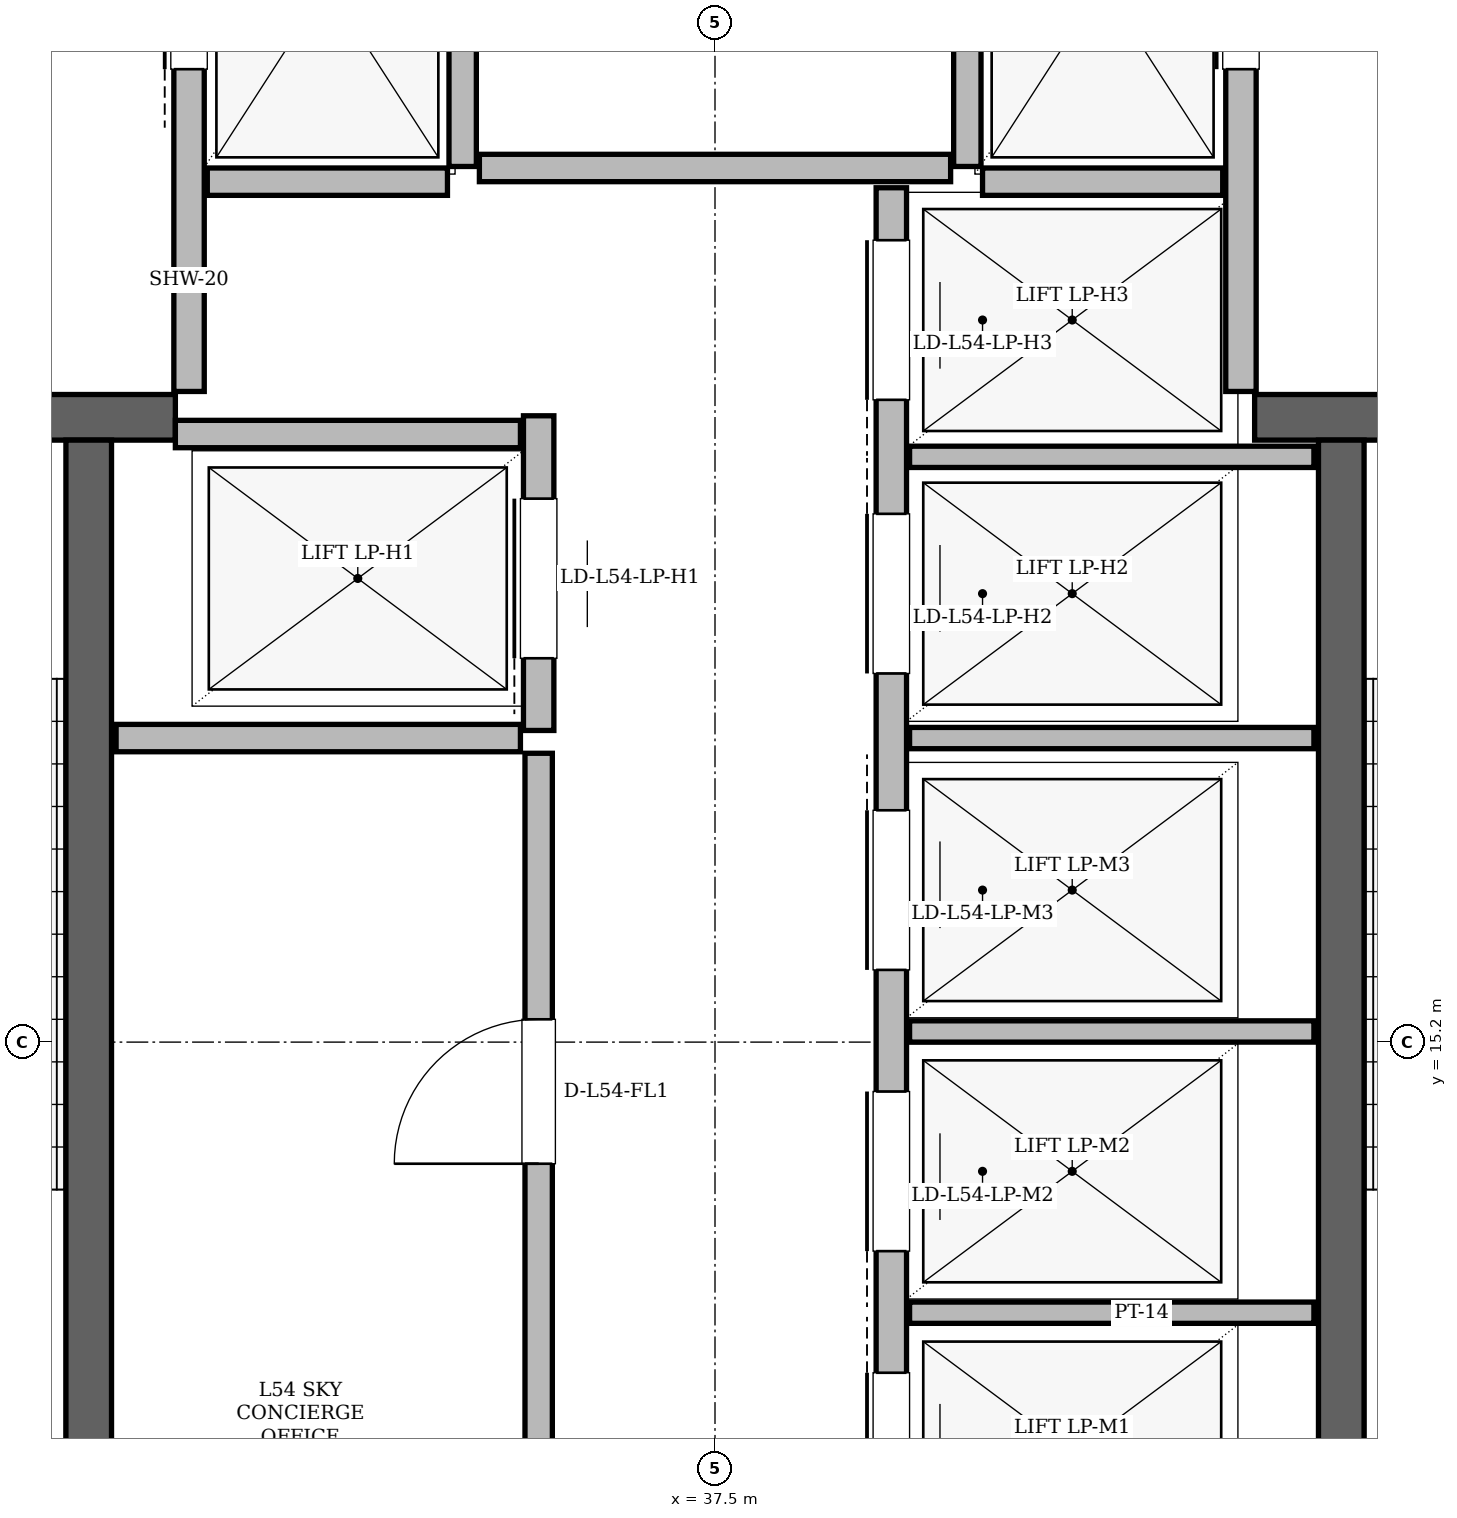
"""IFC4 building model, lengths in metres.
Left out: names, types, materials, properties, quantities, classifications, styles, units other than length and angle.
Written with IfcOpenShell. Run it as: python <this file> out.ifc"""

import sys

from ifc_helpers import new_model, si_unit, direction, frame, frame_2d, origin, place, context, subcontext, project, spatial, rectangle, extrude, element, fill, save


model = new_model("IFC4")
c1 = context("Model", 3, precision=1e-05, world=origin(), true_north=direction((0.0, 1.0)))
c2 = subcontext(c1, "Body", "Model", "MODEL_VIEW")
j1 = project(units=[si_unit("LENGTHUNIT", "METRE"), si_unit("PLANEANGLEUNIT", "RADIAN")], contexts=[c1])
p1 = place(None, origin())
s1 = spatial("IfcSite", under=j1, at=p1, CompositionType="ELEMENT")
p2 = place(p1, origin())
s2 = spatial("IfcBuilding", under=s1, at=p2, CompositionType="ELEMENT")
p3 = place(p2, frame((0.0, 0.0, 204.6)))
s3 = spatial("IfcBuildingStorey", under=s2, at=p3, CompositionType="ELEMENT", Elevation=204.6)
p4 = place(p3, frame((29.94, 19.31, 0.0), z_axis=(0.0, 0.0, 1.0), x_axis=(1.0, 0.0, 0.0)))
e1 = element("IfcWall", 1, at=p4, inside=s3, PredefinedType="SHEAR", context=c2, shape_type="SweptSolid", body=[
    extrude(rectangle(XDim=4.01, YDim=0.3, at=frame_2d((2.005, 0.0))), origin(), (0.0, 0.0, 1.0), 4.28),
])
p5 = place(p4, frame((1.01, 0.0, 0.0)))
e2 = element("IfcOpeningElement", 2, at=p5, cuts=e1, PredefinedType="OPENING", context=c2, shape_type="SweptSolid", body=[
    extrude(rectangle(XDim=1.4, YDim=2.2, at=frame_2d((0.7, 1.1))), frame((0.0, 0.15, 0.0), z_axis=(0.0, -1.0, 0.0), x_axis=(1.0, 0.0, 0.0)), (0.0, 0.0, 1.0), 0.3),
])
p6 = place(p3, frame((41.05, 19.31, 0.0), z_axis=(0.0, 0.0, 1.0), x_axis=(1.0, 0.0, 0.0)))
e3 = element("IfcWall", 3, at=p6, inside=s3, PredefinedType="SHEAR", context=c2, shape_type="SweptSolid", body=[
    extrude(rectangle(XDim=4.01, YDim=0.3, at=frame_2d((2.005, 0.0))), origin(), (0.0, 0.0, 1.0), 4.28),
])
p7 = place(p6, frame((1.6, 0.0, 0.0)))
e4 = element("IfcOpeningElement", 4, at=p7, cuts=e3, PredefinedType="OPENING", context=c2, shape_type="SweptSolid", body=[
    extrude(rectangle(XDim=1.4, YDim=2.2, at=frame_2d((0.7, 1.1))), frame((0.0, 0.15, 0.0), z_axis=(0.0, -1.0, 0.0), x_axis=(1.0, 0.0, 0.0)), (0.0, 0.0, 1.0), 0.3),
])
for number, where, z_axis, x_axis in (
    (5, (33.38, 11.54, 0.0), (0.0, 0.0, 1.0), (0.0, 1.0, 0.0)),
    (6, (41.62, 11.54, 0.0), (0.0, 0.0, 1.0), (0.0, 1.0, 0.0)),
):
    element("IfcWall", number, at=place(p3, frame(where, z_axis=z_axis, x_axis=x_axis)), inside=s3, PredefinedType="SHEAR", context=c2, shape_type="SweptSolid", body=[
        extrude(rectangle(XDim=7.62, YDim=0.3, at=frame_2d((3.81, 0.0))), origin(), (0.0, 0.0, 1.0), 4.28),
    ])
p8 = place(p3, frame((34.04, 19.48, 0.0), z_axis=(0.0, 0.0, 1.0), x_axis=(0.0, 1.0, 0.0)))
e7 = element("IfcWall", 7, at=p8, inside=s3, PredefinedType="PARTITIONING", context=c2, shape_type="SweptSolid", body=[
    extrude(rectangle(XDim=4.5, YDim=0.2, at=frame_2d((2.25, 0.0))), origin(), (0.0, 0.0, 1.0), 4.28),
])
p9 = place(p8, frame((2.12, 0.0, 0.0)))
e8 = element("IfcOpeningElement", 8, at=p9, cuts=e7, PredefinedType="OPENING", context=c2, shape_type="SweptSolid", body=[
    extrude(rectangle(XDim=1.1, YDim=2.2, at=frame_2d((0.55, 1.1))), frame((0.0, 0.1, 0.0), z_axis=(0.0, -1.0, 0.0), x_axis=(1.0, 0.0, 0.0)), (0.0, 0.0, 1.0), 0.2),
])
p10 = place(p3, frame((35.84, 20.96, 0.0), z_axis=(0.0, 0.0, 1.0), x_axis=(0.0, 1.0, 0.0)))
e9 = element("IfcWall", 9, at=p10, inside=s3, PredefinedType="PARTITIONING", context=c2, shape_type="SweptSolid", body=[
    extrude(rectangle(XDim=3.02, YDim=0.18, at=frame_2d((1.51, 0.0))), origin(), (0.0, 0.0, 1.0), 4.28),
])
p11 = place(p3, frame((34.16, 20.86, 0.0), z_axis=(0.0, 0.0, 1.0), x_axis=(1.0, 0.0, 0.0)))
e10 = element("IfcWall", 10, at=p11, inside=s3, PredefinedType="PARTITIONING", context=c2, shape_type="SweptSolid", body=[
    extrude(rectangle(XDim=1.58, YDim=0.18, at=frame_2d((0.79, 0.0))), origin(), (0.0, 0.0, 1.0), 4.28),
])
p12 = place(p3, frame((40.96, 19.48, 0.0), z_axis=(0.0, 0.0, 1.0), x_axis=(0.0, 1.0, 0.0)))
e11 = element("IfcWall", 11, at=p12, inside=s3, PredefinedType="PARTITIONING", context=c2, shape_type="SweptSolid", body=[
    extrude(rectangle(XDim=4.5, YDim=0.2, at=frame_2d((2.25, 0.0))), origin(), (0.0, 0.0, 1.0), 4.28),
])
p13 = place(p12, frame((2.12, 0.0, 0.0)))
e12 = element("IfcOpeningElement", 12, at=p13, cuts=e11, PredefinedType="OPENING", context=c2, shape_type="SweptSolid", body=[
    extrude(rectangle(XDim=1.1, YDim=2.2, at=frame_2d((0.55, 1.1))), frame((0.0, 0.1, 0.0), z_axis=(0.0, -1.0, 0.0), x_axis=(1.0, 0.0, 0.0)), (0.0, 0.0, 1.0), 0.2),
])
p14 = place(p3, frame((39.16, 20.96, 0.0), z_axis=(0.0, 0.0, 1.0), x_axis=(0.0, 1.0, 0.0)))
e13 = element("IfcWall", 13, at=p14, inside=s3, PredefinedType="PARTITIONING", context=c2, shape_type="SweptSolid", body=[
    extrude(rectangle(XDim=3.02, YDim=0.18, at=frame_2d((1.51, 0.0))), origin(), (0.0, 0.0, 1.0), 4.28),
])
p15 = place(p3, frame((39.26, 20.86, 0.0), z_axis=(0.0, 0.0, 1.0), x_axis=(1.0, 0.0, 0.0)))
e14 = element("IfcWall", 14, at=p15, inside=s3, PredefinedType="PARTITIONING", context=c2, shape_type="SweptSolid", body=[
    extrude(rectangle(XDim=1.58, YDim=0.18, at=frame_2d((0.79, 0.0))), origin(), (0.0, 0.0, 1.0), 4.28),
])
p16 = place(p3, frame((36.34, 17.25, 0.0), z_axis=(0.0, 0.0, 1.0), x_axis=(0.0, 1.0, 0.0)))
e15 = element("IfcWall", 15, at=p16, inside=s3, PredefinedType="PARTITIONING", context=c2, shape_type="SweptSolid", body=[
    extrude(rectangle(XDim=2.07, YDim=0.2, at=frame_2d((1.035, 0.0))), origin(), (0.0, 0.0, 1.0), 4.28),
])
p17 = place(p16, frame((0.475, 0.0, 0.0)))
e16 = element("IfcOpeningElement", 16, at=p17, cuts=e15, PredefinedType="OPENING", context=c2, shape_type="SweptSolid", body=[
    extrude(rectangle(XDim=1.05, YDim=2.15, at=frame_2d((0.525, 1.075))), frame((0.0, 0.1, 0.0), z_axis=(0.0, -1.0, 0.0), x_axis=(1.0, 0.0, 0.0)), (0.0, 0.0, 1.0), 0.2),
])
p18 = place(p3, frame((33.95, 19.2, 0.0), z_axis=(0.0, 0.0, 1.0), x_axis=(1.0, 0.0, 0.0)))
e17 = element("IfcWall", 17, at=p18, inside=s3, PredefinedType="PARTITIONING", context=c2, shape_type="SweptSolid", body=[
    extrude(rectangle(XDim=2.27, YDim=0.18, at=frame_2d((1.135, 0.0))), origin(), (0.0, 0.0, 1.0), 4.28),
])
p19 = place(p3, frame((33.56, 17.2, 0.0), z_axis=(0.0, 0.0, 1.0), x_axis=(1.0, 0.0, 0.0)))
e18 = element("IfcWall", 18, at=p19, inside=s3, PredefinedType="PARTITIONING", context=c2, shape_type="SweptSolid", body=[
    extrude(rectangle(XDim=2.66, YDim=0.18, at=frame_2d((1.33, 0.0))), origin(), (0.0, 0.0, 1.0), 4.28),
])
p20 = place(p3, frame((36.34, 11.55, 0.0), z_axis=(0.0, 0.0, 1.0), x_axis=(0.0, 1.0, 0.0)))
e19 = element("IfcWall", 19, at=p20, inside=s3, PredefinedType="PARTITIONING", context=c2, shape_type="SweptSolid", body=[
    extrude(rectangle(XDim=5.55, YDim=0.18, at=frame_2d((2.775, 0.0))), origin(), (0.0, 0.0, 1.0), 4.28),
])
p21 = place(p20, frame((2.85, 0.0, 0.0)))
e20 = element("IfcOpeningElement", 20, at=p21, cuts=e19, PredefinedType="OPENING", context=c2, shape_type="SweptSolid", body=[
    extrude(rectangle(XDim=0.95, YDim=2.1, at=frame_2d((0.475, 1.05))), frame((0.0, 0.09, 0.0), z_axis=(0.0, -1.0, 0.0), x_axis=(1.0, 0.0, 0.0)), (0.0, 0.0, 1.0), 0.18),
])
p22 = place(p3, frame((38.66, 11.72, 0.0), z_axis=(0.0, 0.0, 1.0), x_axis=(0.0, 1.0, 0.0)))
e21 = element("IfcWall", 21, at=p22, inside=s3, PredefinedType="PARTITIONING", context=c2, shape_type="SweptSolid", body=[
    extrude(rectangle(XDim=9.1, YDim=0.2, at=frame_2d((4.55, 0.0))), origin(), (0.0, 0.0, 1.0), 4.28),
])
p23 = place(p22, frame((0.255, 0.0, 0.0)))
e22 = element("IfcOpeningElement", 22, at=p23, cuts=e21, PredefinedType="OPENING", context=c2, shape_type="SweptSolid", body=[
    extrude(rectangle(XDim=1.05, YDim=2.15, at=frame_2d((0.525, 1.075))), frame((0.0, 0.1, 0.0), z_axis=(0.0, -1.0, 0.0), x_axis=(1.0, 0.0, 0.0)), (0.0, 0.0, 1.0), 0.2),
])
p24 = place(p22, frame((2.105, 0.0, 0.0)))
e23 = element("IfcOpeningElement", 23, at=p24, cuts=e21, PredefinedType="OPENING", context=c2, shape_type="SweptSolid", body=[
    extrude(rectangle(XDim=1.05, YDim=2.15, at=frame_2d((0.525, 1.075))), frame((0.0, 0.1, 0.0), z_axis=(0.0, -1.0, 0.0), x_axis=(1.0, 0.0, 0.0)), (0.0, 0.0, 1.0), 0.2),
])
p25 = place(p22, frame((3.955, 0.0, 0.0)))
e24 = element("IfcOpeningElement", 24, at=p25, cuts=e21, PredefinedType="OPENING", context=c2, shape_type="SweptSolid", body=[
    extrude(rectangle(XDim=1.05, YDim=2.15, at=frame_2d((0.525, 1.075))), frame((0.0, 0.1, 0.0), z_axis=(0.0, -1.0, 0.0), x_axis=(1.0, 0.0, 0.0)), (0.0, 0.0, 1.0), 0.2),
])
p26 = place(p22, frame((5.905, 0.0, 0.0)))
e25 = element("IfcOpeningElement", 25, at=p26, cuts=e21, PredefinedType="OPENING", context=c2, shape_type="SweptSolid", body=[
    extrude(rectangle(XDim=1.05, YDim=2.15, at=frame_2d((0.525, 1.075))), frame((0.0, 0.1, 0.0), z_axis=(0.0, -1.0, 0.0), x_axis=(1.0, 0.0, 0.0)), (0.0, 0.0, 1.0), 0.2),
])
p27 = place(p22, frame((7.705, 0.0, 0.0)))
e26 = element("IfcOpeningElement", 26, at=p27, cuts=e21, PredefinedType="OPENING", context=c2, shape_type="SweptSolid", body=[
    extrude(rectangle(XDim=1.05, YDim=2.15, at=frame_2d((0.525, 1.075))), frame((0.0, 0.1, 0.0), z_axis=(0.0, -1.0, 0.0), x_axis=(1.0, 0.0, 0.0)), (0.0, 0.0, 1.0), 0.2),
])
for number, where, z_axis, x_axis in (
    (27, (38.78, 13.42, 0.0), (0.0, 0.0, 1.0), (1.0, 0.0, 0.0)),
    (28, (38.78, 15.27, 0.0), (0.0, 0.0, 1.0), (1.0, 0.0, 0.0)),
    (29, (38.78, 17.2, 0.0), (0.0, 0.0, 1.0), (1.0, 0.0, 0.0)),
    (30, (38.78, 19.05, 0.0), (0.0, 0.0, 1.0), (1.0, 0.0, 0.0)),
):
    element("IfcWall", number, at=place(p3, frame(where, z_axis=z_axis, x_axis=x_axis)), inside=s3, PredefinedType="PARTITIONING", context=c2, shape_type="SweptSolid", body=[
        extrude(rectangle(XDim=2.66, YDim=0.14, at=frame_2d((1.33, 0.0))), origin(), (0.0, 0.0, 1.0), 4.28),
    ])
p28 = place(p3, frame((35.95, 20.95, 0.0), z_axis=(0.0, 0.0, 1.0), x_axis=(1.0, 0.0, 0.0)))
e31 = element("IfcWall", 31, at=p28, inside=s3, PredefinedType="PARTITIONING", context=c2, shape_type="SweptSolid", body=[
    extrude(rectangle(XDim=3.1, YDim=0.18, at=frame_2d((1.55, 0.0))), origin(), (0.0, 0.0, 1.0), 4.28),
])
p29 = place(p21, origin())
e32 = element("IfcDoor", 32, at=p29, inside=s3, OperationType="SINGLE_SWING_LEFT", PredefinedType="DOOR", context=c2, shape_type="SweptSolid", body=[
    extrude(rectangle(XDim=0.95, YDim=2.1, at=frame_2d((0.475, 1.05))), frame((0.0, 0.025, 0.0), z_axis=(0.0, -1.0, 0.0), x_axis=(1.0, 0.0, 0.0)), (0.0, 0.0, 1.0), 0.05),
])
fill(e20, e32)
p30 = place(p9, origin())
e33 = element("IfcDoor", 33, at=p30, inside=s3, OperationType="SLIDING_TO_LEFT", PredefinedType="DOOR", context=c2, shape_type="SweptSolid", body=[
    extrude(rectangle(XDim=1.1, YDim=2.2, at=frame_2d((0.55, 1.1))), frame((0.0, 0.025, 0.0), z_axis=(0.0, -1.0, 0.0), x_axis=(1.0, 0.0, 0.0)), (0.0, 0.0, 1.0), 0.05),
])
fill(e8, e33)
p31 = place(p13, origin())
e34 = element("IfcDoor", 34, at=p31, inside=s3, OperationType="SLIDING_TO_RIGHT", PredefinedType="DOOR", context=c2, shape_type="SweptSolid", body=[
    extrude(rectangle(XDim=1.1, YDim=2.2, at=frame_2d((0.55, 1.1))), frame((0.0, 0.025, 0.0), z_axis=(0.0, -1.0, 0.0), x_axis=(1.0, 0.0, 0.0)), (0.0, 0.0, 1.0), 0.05),
])
fill(e12, e34)
p32 = place(p23, origin())
e35 = element("IfcDoor", 35, at=p32, inside=s3, OperationType="SLIDING_TO_RIGHT", PredefinedType="DOOR", context=c2, shape_type="SweptSolid", body=[
    extrude(rectangle(XDim=1.05, YDim=2.15, at=frame_2d((0.525, 1.075))), frame((0.0, 0.025, 0.0), z_axis=(0.0, -1.0, 0.0), x_axis=(1.0, 0.0, 0.0)), (0.0, 0.0, 1.0), 0.05),
])
fill(e22, e35)
p33 = place(p24, origin())
e36 = element("IfcDoor", 36, at=p33, inside=s3, OperationType="SLIDING_TO_LEFT", PredefinedType="DOOR", context=c2, shape_type="SweptSolid", body=[
    extrude(rectangle(XDim=1.05, YDim=2.15, at=frame_2d((0.525, 1.075))), frame((0.0, 0.025, 0.0), z_axis=(0.0, -1.0, 0.0), x_axis=(1.0, 0.0, 0.0)), (0.0, 0.0, 1.0), 0.05),
])
fill(e23, e36)
p34 = place(p25, origin())
e37 = element("IfcDoor", 37, at=p34, inside=s3, OperationType="SLIDING_TO_RIGHT", PredefinedType="DOOR", context=c2, shape_type="SweptSolid", body=[
    extrude(rectangle(XDim=1.05, YDim=2.15, at=frame_2d((0.525, 1.075))), frame((0.0, 0.025, 0.0), z_axis=(0.0, -1.0, 0.0), x_axis=(1.0, 0.0, 0.0)), (0.0, 0.0, 1.0), 0.05),
])
fill(e24, e37)
p35 = place(p17, origin())
e38 = element("IfcDoor", 38, at=p35, inside=s3, OperationType="SLIDING_TO_LEFT", PredefinedType="DOOR", context=c2, shape_type="SweptSolid", body=[
    extrude(rectangle(XDim=1.05, YDim=2.15, at=frame_2d((0.525, 1.075))), frame((0.0, 0.025, 0.0), z_axis=(0.0, -1.0, 0.0), x_axis=(1.0, 0.0, 0.0)), (0.0, 0.0, 1.0), 0.05),
])
fill(e16, e38)
p36 = place(p26, origin())
e39 = element("IfcDoor", 39, at=p36, inside=s3, OperationType="SLIDING_TO_RIGHT", PredefinedType="DOOR", context=c2, shape_type="SweptSolid", body=[
    extrude(rectangle(XDim=1.05, YDim=2.15, at=frame_2d((0.525, 1.075))), frame((0.0, 0.025, 0.0), z_axis=(0.0, -1.0, 0.0), x_axis=(1.0, 0.0, 0.0)), (0.0, 0.0, 1.0), 0.05),
])
fill(e25, e39)
p37 = place(p27, origin())
e40 = element("IfcDoor", 40, at=p37, inside=s3, OperationType="SLIDING_TO_LEFT", PredefinedType="DOOR", context=c2, shape_type="SweptSolid", body=[
    extrude(rectangle(XDim=1.05, YDim=2.15, at=frame_2d((0.525, 1.075))), frame((0.0, 0.025, 0.0), z_axis=(0.0, -1.0, 0.0), x_axis=(1.0, 0.0, 0.0)), (0.0, 0.0, 1.0), 0.05),
])
fill(e26, e40)
save(model, sys.argv[1])
